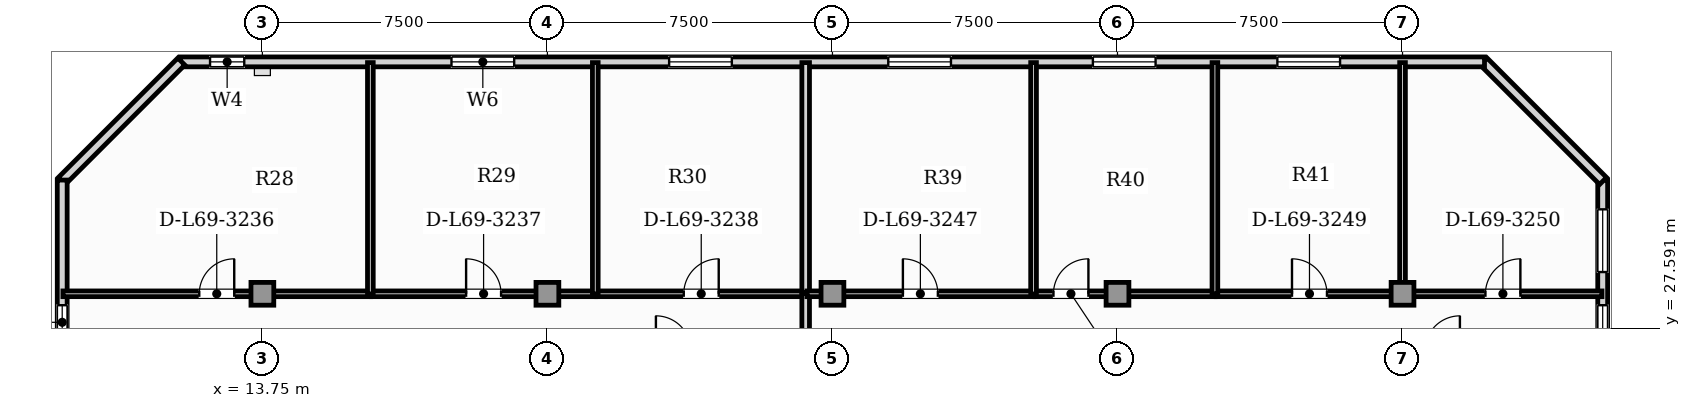
"""IFC4 building model, lengths in metres.
Left out: names, types, materials, properties, quantities, classifications, styles, units other than length and angle.
Written with IfcOpenShell. Run it as: python <this file> out.ifc"""

import sys

from ifc_helpers import new_model, si_unit, direction, frame, frame_2d, origin, origin_2d, place, context, subcontext, project, spatial, rectangle, extrude, element, fill, save


model = new_model("IFC4")
c1 = context("Model", 3, precision=1e-05, world=origin(), true_north=direction((0.0, 1.0)))
c2 = subcontext(c1, "Body", "Model", "MODEL_VIEW")
j1 = project(units=[si_unit("LENGTHUNIT", "METRE"), si_unit("PLANEANGLEUNIT", "RADIAN")], contexts=[c1])
p1 = place(None, origin())
s1 = spatial("IfcSite", under=j1, at=p1, CompositionType="ELEMENT")
p2 = place(p1, origin())
s2 = spatial("IfcBuilding", under=s1, at=p2, CompositionType="ELEMENT")
p3 = place(p2, frame((0.0, 0.0, 281.05)))
s3 = spatial("IfcBuildingStorey", under=s2, at=p3, CompositionType="ELEMENT", Elevation=281.05)
for number, where, z_axis, x_axis in (
    (1, (13.75, 28.5, 0.0), (0.0, 0.0, 1.0), (1.0, 0.0, 0.0)),
    (2, (21.25, 28.5, 0.0), (0.0, 0.0, 1.0), (1.0, 0.0, 0.0)),
    (3, (28.75, 28.5, 0.0), (0.0, 0.0, 1.0), (1.0, 0.0, 0.0)),
    (4, (36.25, 28.5, 0.0), (0.0, 0.0, 1.0), (1.0, 0.0, 0.0)),
    (5, (43.75, 28.5, 0.0), (0.0, 0.0, 1.0), (1.0, 0.0, 0.0)),
):
    element("IfcColumn", number, at=place(p3, frame(where, z_axis=z_axis, x_axis=x_axis)), inside=s3, PredefinedType="COLUMN", context=c2, shape_type="SweptSolid", body=[
        extrude(rectangle(XDim=0.6, YDim=0.6, at=origin_2d()), origin(), (0.0, 0.0, 1.0), 3.85),
    ])
p4 = place(p3, frame((49.017, 25.056, 0.0), z_axis=(0.0, 0.0, 1.0), x_axis=(0.0, 1.0, 0.0)))
e6 = element("IfcWall", 6, at=p4, inside=s3, PredefinedType="SOLIDWALL", context=c2, shape_type="SweptSolid", body=[
    extrude(rectangle(XDim=6.436, YDim=0.26, at=frame_2d((3.218, 0.0))), origin(), (0.0, 0.0, 1.0), 3.65),
])
p5 = place(p4, frame((2.244, 0.0, 0.95)))
e7 = element("IfcOpeningElement", 7, at=p5, cuts=e6, PredefinedType="OPENING", context=c2, shape_type="SweptSolid", body=[
    extrude(rectangle(XDim=0.9, YDim=1.5, at=frame_2d((0.45, 0.75))), frame((0.0, 0.14, 0.0), z_axis=(0.0, -1.0, 0.0), x_axis=(1.0, 0.0, 0.0)), (0.0, 0.0, 1.0), 0.28),
])
p6 = place(p4, frame((4.016, 0.0, 0.88)))
e8 = element("IfcOpeningElement", 8, at=p6, cuts=e6, PredefinedType="OPENING", context=c2, shape_type="SweptSolid", body=[
    extrude(rectangle(XDim=1.65, YDim=2.0, at=frame_2d((0.825, 1.0))), frame((0.0, 0.14, 0.0), z_axis=(0.0, -1.0, 0.0), x_axis=(1.0, 0.0, 0.0)), (0.0, 0.0, 1.0), 0.28),
])
p7 = place(p3, frame((49.027, 31.469, 0.0), z_axis=(0.0, 0.0, 1.0), x_axis=(-0.707106781187, 0.707106781187, 0.0)))
e9 = element("IfcWall", 9, at=p7, inside=s3, PredefinedType="SOLIDWALL", context=c2, shape_type="SweptSolid", body=[
    extrude(rectangle(XDim=4.445, YDim=0.26, at=frame_2d((2.223, 0.0))), origin(), (0.0, 0.0, 1.0), 3.65),
])
p8 = place(p3, frame((45.907, 34.603, 0.0), z_axis=(0.0, 0.0, 1.0), x_axis=(-1.0, 0.0, 0.0)))
e10 = element("IfcWall", 10, at=p8, inside=s3, PredefinedType="SOLIDWALL", context=c2, shape_type="SweptSolid", body=[
    extrude(rectangle(XDim=34.314, YDim=0.26, at=frame_2d((17.157, 0.0))), origin(), (0.0, 0.0, 1.0), 3.65),
])
p9 = place(p8, frame((32.634, 0.0, 0.95)))
e11 = element("IfcOpeningElement", 11, at=p9, cuts=e10, PredefinedType="OPENING", context=c2, shape_type="SweptSolid", body=[
    extrude(rectangle(XDim=0.9, YDim=1.5, at=frame_2d((0.45, 0.75))), frame((0.0, 0.14, 0.0), z_axis=(0.0, -1.0, 0.0), x_axis=(1.0, 0.0, 0.0)), (0.0, 0.0, 1.0), 0.28),
])
p10 = place(p8, frame((25.531, 0.0, 0.88)))
e12 = element("IfcOpeningElement", 12, at=p10, cuts=e10, PredefinedType="OPENING", context=c2, shape_type="SweptSolid", body=[
    extrude(rectangle(XDim=1.65, YDim=2.0, at=frame_2d((0.825, 1.0))), frame((0.0, 0.14, 0.0), z_axis=(0.0, -1.0, 0.0), x_axis=(1.0, 0.0, 0.0)), (0.0, 0.0, 1.0), 0.28),
])
p11 = place(p8, frame((19.804, 0.0, 0.88)))
e13 = element("IfcOpeningElement", 13, at=p11, cuts=e10, PredefinedType="OPENING", context=c2, shape_type="SweptSolid", body=[
    extrude(rectangle(XDim=1.65, YDim=2.0, at=frame_2d((0.825, 1.0))), frame((0.0, 0.14, 0.0), z_axis=(0.0, -1.0, 0.0), x_axis=(1.0, 0.0, 0.0)), (0.0, 0.0, 1.0), 0.28),
])
p12 = place(p8, frame((14.038, 0.0, 0.88)))
e14 = element("IfcOpeningElement", 14, at=p12, cuts=e10, PredefinedType="OPENING", context=c2, shape_type="SweptSolid", body=[
    extrude(rectangle(XDim=1.65, YDim=2.0, at=frame_2d((0.825, 1.0))), frame((0.0, 0.14, 0.0), z_axis=(0.0, -1.0, 0.0), x_axis=(1.0, 0.0, 0.0)), (0.0, 0.0, 1.0), 0.28),
])
p13 = place(p8, frame((8.654, 0.0, 0.88)))
e15 = element("IfcOpeningElement", 15, at=p13, cuts=e10, PredefinedType="OPENING", context=c2, shape_type="SweptSolid", body=[
    extrude(rectangle(XDim=1.65, YDim=2.0, at=frame_2d((0.825, 1.0))), frame((0.0, 0.14, 0.0), z_axis=(0.0, -1.0, 0.0), x_axis=(1.0, 0.0, 0.0)), (0.0, 0.0, 1.0), 0.28),
])
p14 = place(p8, frame((3.8, 0.0, 0.88)))
e16 = element("IfcOpeningElement", 16, at=p14, cuts=e10, PredefinedType="OPENING", context=c2, shape_type="SweptSolid", body=[
    extrude(rectangle(XDim=1.65, YDim=2.0, at=frame_2d((0.825, 1.0))), frame((0.0, 0.14, 0.0), z_axis=(0.0, -1.0, 0.0), x_axis=(1.0, 0.0, 0.0)), (0.0, 0.0, 1.0), 0.28),
])
p15 = place(p3, frame((11.617, 34.612, 0.0), z_axis=(0.0, 0.0, 1.0), x_axis=(-0.707106781187, -0.707106781187, 0.0)))
e17 = element("IfcWall", 17, at=p15, inside=s3, PredefinedType="SOLIDWALL", context=c2, shape_type="SweptSolid", body=[
    extrude(rectangle(XDim=4.445, YDim=0.26, at=frame_2d((2.223, 0.0))), origin(), (0.0, 0.0, 1.0), 3.65),
])
p16 = place(p3, frame((8.483, 31.492, 0.0), z_axis=(0.0, 0.0, 1.0), x_axis=(0.0, -1.0, 0.0)))
e18 = element("IfcWall", 18, at=p16, inside=s3, PredefinedType="SOLIDWALL", context=c2, shape_type="SweptSolid", body=[
    extrude(rectangle(XDim=6.436, YDim=0.26, at=frame_2d((3.218, 0.0))), origin(), (0.0, 0.0, 1.0), 3.65),
])
p17 = place(p16, frame((3.292, 0.0, 0.95)))
e19 = element("IfcOpeningElement", 19, at=p17, cuts=e18, PredefinedType="OPENING", context=c2, shape_type="SweptSolid", body=[
    extrude(rectangle(XDim=0.9, YDim=1.5, at=frame_2d((0.45, 0.75))), frame((0.0, 0.14, 0.0), z_axis=(0.0, -1.0, 0.0), x_axis=(1.0, 0.0, 0.0)), (0.0, 0.0, 1.0), 0.28),
])
p18 = place(p3, frame((8.503, 28.5, 0.0), z_axis=(0.0, 0.0, 1.0), x_axis=(1.0, 0.0, 0.0)))
e20 = element("IfcWall", 20, at=p18, inside=s3, PredefinedType="PARTITIONING", context=c2, shape_type="SweptSolid", body=[
    extrude(rectangle(XDim=8.094, YDim=0.15, at=frame_2d((4.047, 0.0))), origin(), (0.0, 0.0, 1.0), 3.117),
])
p19 = place(p18, frame((3.587, 0.0, 0.0)))
e21 = element("IfcOpeningElement", 21, at=p19, cuts=e20, PredefinedType="OPENING", context=c2, shape_type="SweptSolid", body=[
    extrude(rectangle(XDim=0.92, YDim=2.1, at=frame_2d((0.46, 1.05))), frame((0.0, 0.085, 0.0), z_axis=(0.0, -1.0, 0.0), x_axis=(1.0, 0.0, 0.0)), (0.0, 0.0, 1.0), 0.17),
])
p20 = place(p3, frame((16.626, 28.5, 0.0), z_axis=(0.0, 0.0, 1.0), x_axis=(1.0, 0.0, 0.0)))
e22 = element("IfcWall", 22, at=p20, inside=s3, PredefinedType="PARTITIONING", context=c2, shape_type="SweptSolid", body=[
    extrude(rectangle(XDim=5.888, YDim=0.15, at=frame_2d((2.944, 0.0))), origin(), (0.0, 0.0, 1.0), 3.117),
])
p21 = place(p20, frame((2.484, 0.0, 0.0)))
e23 = element("IfcOpeningElement", 23, at=p21, cuts=e22, PredefinedType="OPENING", context=c2, shape_type="SweptSolid", body=[
    extrude(rectangle(XDim=0.92, YDim=2.1, at=frame_2d((0.46, 1.05))), frame((0.0, 0.085, 0.0), z_axis=(0.0, -1.0, 0.0), x_axis=(1.0, 0.0, 0.0)), (0.0, 0.0, 1.0), 0.17),
])
p22 = place(p3, frame((22.545, 28.5, 0.0), z_axis=(0.0, 0.0, 1.0), x_axis=(1.0, 0.0, 0.0)))
e24 = element("IfcWall", 24, at=p22, inside=s3, PredefinedType="PARTITIONING", context=c2, shape_type="SweptSolid", body=[
    extrude(rectangle(XDim=5.506, YDim=0.15, at=frame_2d((2.753, 0.0))), origin(), (0.0, 0.0, 1.0), 3.117),
])
p23 = place(p22, frame((2.293, 0.0, 0.0)))
e25 = element("IfcOpeningElement", 25, at=p23, cuts=e24, PredefinedType="OPENING", context=c2, shape_type="SweptSolid", body=[
    extrude(rectangle(XDim=0.92, YDim=2.1, at=frame_2d((0.46, 1.05))), frame((0.0, 0.085, 0.0), z_axis=(0.0, -1.0, 0.0), x_axis=(1.0, 0.0, 0.0)), (0.0, 0.0, 1.0), 0.17),
])
p24 = place(p3, frame((28.045, 26.995, 0.0), z_axis=(0.0, 0.0, 1.0), x_axis=(0.0, 1.0, 0.0)))
e26 = element("IfcWall", 26, at=p24, inside=s3, PredefinedType="PARTITIONING", context=c2, shape_type="SweptSolid", body=[
    extrude(rectangle(XDim=1.51, YDim=0.2, at=frame_2d((0.755, 0.0))), origin(), (0.0, 0.0, 1.0), 3.65),
])
for number, where, z_axis, x_axis in (
    (27, (16.592, 28.495, 0.0), (0.0, 0.0, 1.0), (0.0, 1.0, 0.0)),
    (28, (22.51, 28.495, 0.0), (0.0, 0.0, 1.0), (0.0, 1.0, 0.0)),
):
    element("IfcWall", number, at=place(p3, frame(where, z_axis=z_axis, x_axis=x_axis)), inside=s3, PredefinedType="PARTITIONING", context=c2, shape_type="SweptSolid", body=[
        extrude(rectangle(XDim=6.088, YDim=0.15, at=frame_2d((3.044, 0.0))), origin(), (0.0, 0.0, 1.0), 3.65),
    ])
p25 = place(p3, frame((28.045, 28.535, 0.0), z_axis=(0.0, 0.0, 1.0), x_axis=(0.0, 1.0, 0.0)))
e29 = element("IfcWall", 29, at=p25, inside=s3, PredefinedType="PARTITIONING", context=c2, shape_type="SweptSolid", body=[
    extrude(rectangle(XDim=6.048, YDim=0.2, at=frame_2d((3.024, 0.0))), origin(), (0.0, 0.0, 1.0), 3.65),
])
p26 = place(p3, frame((28.08, 28.5, 0.0), z_axis=(0.0, 0.0, 1.0), x_axis=(1.0, 0.0, 0.0)))
e30 = element("IfcWall", 30, at=p26, inside=s3, PredefinedType="PARTITIONING", context=c2, shape_type="SweptSolid", body=[
    extrude(rectangle(XDim=5.966, YDim=0.15, at=frame_2d((2.983, 0.0))), origin(), (0.0, 0.0, 1.0), 3.117),
])
p27 = place(p26, frame((2.523, 0.0, 0.0)))
e31 = element("IfcOpeningElement", 31, at=p27, cuts=e30, PredefinedType="OPENING", context=c2, shape_type="SweptSolid", body=[
    extrude(rectangle(XDim=0.92, YDim=2.1, at=frame_2d((0.46, 1.05))), frame((0.0, 0.085, 0.0), z_axis=(0.0, -1.0, 0.0), x_axis=(1.0, 0.0, 0.0)), (0.0, 0.0, 1.0), 0.17),
])
p28 = place(p3, frame((34.077, 28.5, 0.0), z_axis=(0.0, 0.0, 1.0), x_axis=(1.0, 0.0, 0.0)))
e32 = element("IfcWall", 32, at=p28, inside=s3, PredefinedType="PARTITIONING", context=c2, shape_type="SweptSolid", body=[
    extrude(rectangle(XDim=4.742, YDim=0.15, at=frame_2d((2.371, 0.0))), origin(), (0.0, 0.0, 1.0), 3.117),
])
p29 = place(p28, frame((0.488, 0.0, 0.0)))
e33 = element("IfcOpeningElement", 33, at=p29, cuts=e32, PredefinedType="OPENING", context=c2, shape_type="SweptSolid", body=[
    extrude(rectangle(XDim=0.92, YDim=2.1, at=frame_2d((0.46, 1.05))), frame((0.0, 0.085, 0.0), z_axis=(0.0, -1.0, 0.0), x_axis=(1.0, 0.0, 0.0)), (0.0, 0.0, 1.0), 0.17),
])
p30 = place(p3, frame((38.848, 28.5, 0.0), z_axis=(0.0, 0.0, 1.0), x_axis=(1.0, 0.0, 0.0)))
e34 = element("IfcWall", 34, at=p30, inside=s3, PredefinedType="PARTITIONING", context=c2, shape_type="SweptSolid", body=[
    extrude(rectangle(XDim=4.906, YDim=0.15, at=frame_2d((2.453, 0.0))), origin(), (0.0, 0.0, 1.0), 3.117),
])
p31 = place(p30, frame((1.993, 0.0, 0.0)))
e35 = element("IfcOpeningElement", 35, at=p31, cuts=e34, PredefinedType="OPENING", context=c2, shape_type="SweptSolid", body=[
    extrude(rectangle(XDim=0.92, YDim=2.1, at=frame_2d((0.46, 1.05))), frame((0.0, 0.085, 0.0), z_axis=(0.0, -1.0, 0.0), x_axis=(1.0, 0.0, 0.0)), (0.0, 0.0, 1.0), 0.17),
])
p32 = place(p3, frame((43.785, 28.5, 0.0), z_axis=(0.0, 0.0, 1.0), x_axis=(1.0, 0.0, 0.0)))
e36 = element("IfcWall", 36, at=p32, inside=s3, PredefinedType="PARTITIONING", context=c2, shape_type="SweptSolid", body=[
    extrude(rectangle(XDim=5.212, YDim=0.15, at=frame_2d((2.606, 0.0))), origin(), (0.0, 0.0, 1.0), 3.65),
])
p33 = place(p32, frame((2.146, 0.0, 0.0)))
e37 = element("IfcOpeningElement", 37, at=p33, cuts=e36, PredefinedType="OPENING", context=c2, shape_type="SweptSolid", body=[
    extrude(rectangle(XDim=0.92, YDim=2.1, at=frame_2d((0.46, 1.05))), frame((0.0, 0.085, 0.0), z_axis=(0.0, -1.0, 0.0), x_axis=(1.0, 0.0, 0.0)), (0.0, 0.0, 1.0), 0.17),
])
for number, where, z_axis, x_axis in (
    (38, (34.042, 28.495, 0.0), (0.0, 0.0, 1.0), (0.0, 1.0, 0.0)),
    (39, (38.813, 28.495, 0.0), (0.0, 0.0, 1.0), (0.0, 1.0, 0.0)),
    (40, (43.75, 28.495, 0.0), (0.0, 0.0, 1.0), (0.0, 1.0, 0.0)),
):
    element("IfcWall", number, at=place(p3, frame(where, z_axis=z_axis, x_axis=x_axis)), inside=s3, PredefinedType="PARTITIONING", context=c2, shape_type="SweptSolid", body=[
        extrude(rectangle(XDim=6.088, YDim=0.15, at=frame_2d((3.044, 0.0))), origin(), (0.0, 0.0, 1.0), 3.65),
    ])
p34 = place(p17, origin())
e41 = element("IfcWindow", 41, at=p34, inside=s3, PartitioningType="SINGLE_PANEL", PredefinedType="WINDOW", context=c2, shape_type="SweptSolid", body=[
    extrude(rectangle(XDim=0.9, YDim=1.5, at=frame_2d((0.45, 0.75))), frame((0.0, 0.03, 0.0), z_axis=(0.0, -1.0, 0.0), x_axis=(1.0, 0.0, 0.0)), (0.0, 0.0, 1.0), 0.06),
])
fill(e19, e41)
p35 = place(p9, origin())
e42 = element("IfcWindow", 42, at=p35, inside=s3, PartitioningType="SINGLE_PANEL", PredefinedType="WINDOW", context=c2, shape_type="SweptSolid", body=[
    extrude(rectangle(XDim=0.9, YDim=1.5, at=frame_2d((0.45, 0.75))), frame((0.0, 0.03, 0.0), z_axis=(0.0, -1.0, 0.0), x_axis=(1.0, 0.0, 0.0)), (0.0, 0.0, 1.0), 0.06),
])
fill(e11, e42)
p36 = place(p10, origin())
e43 = element("IfcWindow", 43, at=p36, inside=s3, PartitioningType="SINGLE_PANEL", PredefinedType="WINDOW", context=c2, shape_type="SweptSolid", body=[
    extrude(rectangle(XDim=1.65, YDim=2.0, at=frame_2d((0.825, 1.0))), frame((0.0, 0.03, 0.0), z_axis=(0.0, -1.0, 0.0), x_axis=(1.0, 0.0, 0.0)), (0.0, 0.0, 1.0), 0.06),
])
fill(e12, e43)
p37 = place(p11, origin())
e44 = element("IfcWindow", 44, at=p37, inside=s3, PartitioningType="SINGLE_PANEL", PredefinedType="WINDOW", context=c2, shape_type="SweptSolid", body=[
    extrude(rectangle(XDim=1.65, YDim=2.0, at=frame_2d((0.825, 1.0))), frame((0.0, 0.03, 0.0), z_axis=(0.0, -1.0, 0.0), x_axis=(1.0, 0.0, 0.0)), (0.0, 0.0, 1.0), 0.06),
])
fill(e13, e44)
p38 = place(p5, origin())
e45 = element("IfcWindow", 45, at=p38, inside=s3, PartitioningType="SINGLE_PANEL", PredefinedType="WINDOW", context=c2, shape_type="SweptSolid", body=[
    extrude(rectangle(XDim=0.9, YDim=1.5, at=frame_2d((0.45, 0.75))), frame((0.0, 0.03, 0.0), z_axis=(0.0, -1.0, 0.0), x_axis=(1.0, 0.0, 0.0)), (0.0, 0.0, 1.0), 0.06),
])
fill(e7, e45)
p39 = place(p12, origin())
e46 = element("IfcWindow", 46, at=p39, inside=s3, PartitioningType="SINGLE_PANEL", PredefinedType="WINDOW", context=c2, shape_type="SweptSolid", body=[
    extrude(rectangle(XDim=1.65, YDim=2.0, at=frame_2d((0.825, 1.0))), frame((0.0, 0.03, 0.0), z_axis=(0.0, -1.0, 0.0), x_axis=(1.0, 0.0, 0.0)), (0.0, 0.0, 1.0), 0.06),
])
fill(e14, e46)
p40 = place(p13, origin())
e47 = element("IfcWindow", 47, at=p40, inside=s3, PartitioningType="SINGLE_PANEL", PredefinedType="WINDOW", context=c2, shape_type="SweptSolid", body=[
    extrude(rectangle(XDim=1.65, YDim=2.0, at=frame_2d((0.825, 1.0))), frame((0.0, 0.03, 0.0), z_axis=(0.0, -1.0, 0.0), x_axis=(1.0, 0.0, 0.0)), (0.0, 0.0, 1.0), 0.06),
])
fill(e15, e47)
p41 = place(p14, origin())
e48 = element("IfcWindow", 48, at=p41, inside=s3, PartitioningType="SINGLE_PANEL", PredefinedType="WINDOW", context=c2, shape_type="SweptSolid", body=[
    extrude(rectangle(XDim=1.65, YDim=2.0, at=frame_2d((0.825, 1.0))), frame((0.0, 0.03, 0.0), z_axis=(0.0, -1.0, 0.0), x_axis=(1.0, 0.0, 0.0)), (0.0, 0.0, 1.0), 0.06),
])
fill(e16, e48)
p42 = place(p6, origin())
e49 = element("IfcWindow", 49, at=p42, inside=s3, PartitioningType="SINGLE_PANEL", PredefinedType="WINDOW", context=c2, shape_type="SweptSolid", body=[
    extrude(rectangle(XDim=1.65, YDim=2.0, at=frame_2d((0.825, 1.0))), frame((0.0, 0.03, 0.0), z_axis=(0.0, -1.0, 0.0), x_axis=(1.0, 0.0, 0.0)), (0.0, 0.0, 1.0), 0.06),
])
fill(e8, e49)
p43 = place(p19, origin())
e50 = element("IfcDoor", 50, at=p43, inside=s3, OperationType="SINGLE_SWING_RIGHT", PredefinedType="DOOR", context=c2, shape_type="SweptSolid", body=[
    extrude(rectangle(XDim=0.92, YDim=2.1, at=frame_2d((0.46, 1.05))), frame((0.0, 0.025, 0.0), z_axis=(0.0, -1.0, 0.0), x_axis=(1.0, 0.0, 0.0)), (0.0, 0.0, 1.0), 0.05),
])
fill(e21, e50)
p44 = place(p21, origin())
e51 = element("IfcDoor", 51, at=p44, inside=s3, OperationType="SINGLE_SWING_LEFT", PredefinedType="DOOR", context=c2, shape_type="SweptSolid", body=[
    extrude(rectangle(XDim=0.92, YDim=2.1, at=frame_2d((0.46, 1.05))), frame((0.0, 0.025, 0.0), z_axis=(0.0, -1.0, 0.0), x_axis=(1.0, 0.0, 0.0)), (0.0, 0.0, 1.0), 0.05),
])
fill(e23, e51)
p45 = place(p23, origin())
e52 = element("IfcDoor", 52, at=p45, inside=s3, OperationType="SINGLE_SWING_RIGHT", PredefinedType="DOOR", context=c2, shape_type="SweptSolid", body=[
    extrude(rectangle(XDim=0.92, YDim=2.1, at=frame_2d((0.46, 1.05))), frame((0.0, 0.025, 0.0), z_axis=(0.0, -1.0, 0.0), x_axis=(1.0, 0.0, 0.0)), (0.0, 0.0, 1.0), 0.05),
])
fill(e25, e52)
p46 = place(p27, origin())
e53 = element("IfcDoor", 53, at=p46, inside=s3, OperationType="SINGLE_SWING_LEFT", PredefinedType="DOOR", context=c2, shape_type="SweptSolid", body=[
    extrude(rectangle(XDim=0.92, YDim=2.1, at=frame_2d((0.46, 1.05))), frame((0.0, 0.025, 0.0), z_axis=(0.0, -1.0, 0.0), x_axis=(1.0, 0.0, 0.0)), (0.0, 0.0, 1.0), 0.05),
])
fill(e31, e53)
p47 = place(p29, origin())
e54 = element("IfcDoor", 54, at=p47, inside=s3, OperationType="SINGLE_SWING_RIGHT", PredefinedType="DOOR", context=c2, shape_type="SweptSolid", body=[
    extrude(rectangle(XDim=0.92, YDim=2.1, at=frame_2d((0.46, 1.05))), frame((0.0, 0.025, 0.0), z_axis=(0.0, -1.0, 0.0), x_axis=(1.0, 0.0, 0.0)), (0.0, 0.0, 1.0), 0.05),
])
fill(e33, e54)
p48 = place(p31, origin())
e55 = element("IfcDoor", 55, at=p48, inside=s3, OperationType="SINGLE_SWING_LEFT", PredefinedType="DOOR", context=c2, shape_type="SweptSolid", body=[
    extrude(rectangle(XDim=0.92, YDim=2.1, at=frame_2d((0.46, 1.05))), frame((0.0, 0.025, 0.0), z_axis=(0.0, -1.0, 0.0), x_axis=(1.0, 0.0, 0.0)), (0.0, 0.0, 1.0), 0.05),
])
fill(e35, e55)
p49 = place(p33, origin())
e56 = element("IfcDoor", 56, at=p49, inside=s3, OperationType="SINGLE_SWING_RIGHT", PredefinedType="DOOR", context=c2, shape_type="SweptSolid", body=[
    extrude(rectangle(XDim=0.92, YDim=2.1, at=frame_2d((0.46, 1.05))), frame((0.0, 0.025, 0.0), z_axis=(0.0, -1.0, 0.0), x_axis=(1.0, 0.0, 0.0)), (0.0, 0.0, 1.0), 0.05),
])
fill(e37, e56)
save(model, sys.argv[1])
